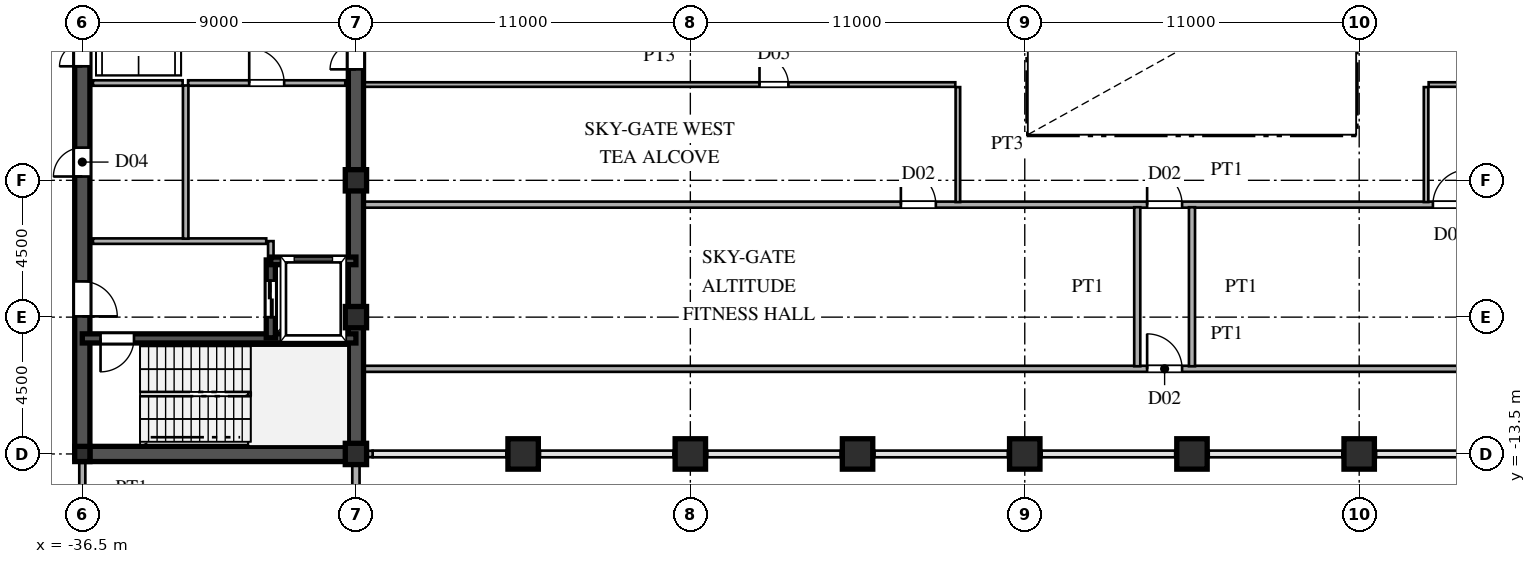
"""IFC4 building model, lengths in metres.
Left out: names, types, materials, properties, quantities, classifications, styles, units other than length and angle.
Written with IfcOpenShell. Run it as: python <this file> out.ifc"""

import sys

from ifc_helpers import new_model, si_unit, direction, frame, frame_2d, origin, origin_2d, place, context, subcontext, project, spatial, rectangle, hollow_rectangle, i_section, extrude, source, transform, mapped, element, fill, save


model = new_model("IFC4")
c1 = context("Model", 3, precision=1e-05, world=origin(), true_north=direction((0.0, 1.0)))
c2 = subcontext(c1, "Body", "Model", "MODEL_VIEW")
j1 = project(units=[si_unit("LENGTHUNIT", "METRE"), si_unit("PLANEANGLEUNIT", "RADIAN")], contexts=[c1])
p1 = place(None, origin())
s1 = spatial("IfcSite", under=j1, at=p1, CompositionType="ELEMENT")
p2 = place(p1, origin())
s2 = spatial("IfcBuilding", under=s1, at=p2, CompositionType="ELEMENT")
p3 = place(p2, frame((0.0, 0.0, 234.6)))
s3 = spatial("IfcBuildingStorey", under=s2, at=p3, CompositionType="ELEMENT", Elevation=234.6)
m1 = source(origin(), c2, "Body", "SweptSolid", [
    extrude(hollow_rectangle(XDim=0.7, YDim=0.7, WallThickness=0.03, at=origin_2d()), origin(), (0.0, 0.0, 1.0), 4.8),
])
for number, where, z_axis, x_axis in (
    (1, (-27.5, -13.5, 0.0), (0.0, 0.0, 1.0), (1.0, 0.0, 0.0)),
    (2, (-27.5, -9.0, 0.0), (0.0, 0.0, 1.0), (1.0, 0.0, 0.0)),
    (3, (-27.5, -4.5, 0.0), (0.0, 0.0, 1.0), (1.0, 0.0, 0.0)),
):
    element("IfcColumn", number, at=place(p3, frame(where, z_axis=z_axis, x_axis=x_axis)), inside=s3, PredefinedType="COLUMN", context=c2, shape_type="MappedRepresentation", body=[
        mapped(m1, transform((0.0, 0.0, 0.0), scale=1.0)),
    ])
m2 = source(origin(), c2, "Body", "SweptSolid", [
    extrude(i_section(OverallWidth=0.5, OverallDepth=0.5, WebThickness=0.02, FlangeThickness=0.032, at=origin_2d()), origin(), (0.0, 0.0, 1.0), 4.8),
])
p4 = place(p3, frame((-36.5, -13.5, 0.0), z_axis=(0.0, 0.0, 1.0), x_axis=(1.0, 0.0, 0.0)))
e4 = element("IfcColumn", 4, at=p4, inside=s3, PredefinedType="COLUMN", context=c2, shape_type="MappedRepresentation", body=[
    mapped(m2, transform((0.0, 0.0, 0.0), scale=1.0)),
])
m3 = source(origin(), c2, "Body", "SweptSolid", [
    extrude(hollow_rectangle(XDim=1.0, YDim=1.0, WallThickness=0.042, at=origin_2d()), origin(), (0.0, 0.0, 1.0), 4.8),
])
for number, where, z_axis, x_axis in (
    (5, (-22.0, -13.5, 0.0), (0.0, 0.0, 1.0), (1.0, 0.0, 0.0)),
    (6, (-16.5, -13.5, 0.0), (0.0, 0.0, 1.0), (1.0, 0.0, 0.0)),
    (7, (-11.0, -13.5, 0.0), (0.0, 0.0, 1.0), (1.0, 0.0, 0.0)),
    (8, (-5.5, -13.5, 0.0), (0.0, 0.0, 1.0), (1.0, 0.0, 0.0)),
    (9, (0.0, -13.5, 0.0), (0.0, 0.0, 1.0), (1.0, 0.0, 0.0)),
    (10, (5.5, -13.5, 0.0), (0.0, 0.0, 1.0), (1.0, 0.0, 0.0)),
):
    element("IfcColumn", number, at=place(p3, frame(where, z_axis=z_axis, x_axis=x_axis)), inside=s3, PredefinedType="COLUMN", context=c2, shape_type="MappedRepresentation", body=[
        mapped(m3, transform((0.0, 0.0, 0.0), scale=1.0)),
    ])
p5 = place(p3, frame((-27.5, -15.98, 0.0), z_axis=(0.0, 0.0, 1.0), x_axis=(0.0, 1.0, 0.0)))
e11 = element("IfcWall", 11, at=p5, inside=s3, PredefinedType="SOLIDWALL", context=c2, shape_type="SweptSolid", body=[
    extrude(rectangle(XDim=1.605, YDim=0.24, at=frame_2d((0.803, 0.0))), origin(), (0.0, 0.0, 1.0), 4.58),
])
p6 = place(p3, frame((-27.5, -14.375, 0.0), z_axis=(0.0, 0.0, 1.0), x_axis=(0.0, 1.0, 0.0)))
e12 = element("IfcWall", 12, at=p6, inside=s3, PredefinedType="SOLIDWALL", context=c2, shape_type="SweptSolid", body=[
    extrude(rectangle(XDim=0.62, YDim=0.24, at=frame_2d((0.31, 0.0))), origin(), (0.0, 0.0, 1.0), 4.08),
])
p7 = place(p3, frame((-27.49, -13.5, 0.0), z_axis=(0.0, 0.0, 1.0), x_axis=(1.0, 0.0, 0.0)))
e13 = element("IfcWall", 13, at=p7, inside=s3, PredefinedType="SOLIDWALL", context=c2, shape_type="SweptSolid", body=[
    extrude(rectangle(XDim=0.54, YDim=0.21, at=frame_2d((0.27, 0.0))), origin(), (0.0, 0.0, 1.0), 2.78),
])
for number, where, z_axis, x_axis in (
    (14, (-22.55, -13.5, 0.0), (0.0, 0.0, 1.0), (1.0, 0.0, 0.0)),
    (15, (-17.05, -13.5, 0.0), (0.0, 0.0, 1.0), (1.0, 0.0, 0.0)),
    (16, (-11.55, -13.5, 0.0), (0.0, 0.0, 1.0), (1.0, 0.0, 0.0)),
    (17, (-6.05, -13.5, 0.0), (0.0, 0.0, 1.0), (1.0, 0.0, 0.0)),
    (18, (-0.55, -13.5, 0.0), (0.0, 0.0, 1.0), (1.0, 0.0, 0.0)),
    (19, (4.95, -13.5, 0.0), (0.0, 0.0, 1.0), (1.0, 0.0, 0.0)),
):
    element("IfcWall", number, at=place(p3, frame(where, z_axis=z_axis, x_axis=x_axis)), inside=s3, PredefinedType="SOLIDWALL", context=c2, shape_type="SweptSolid", body=[
        extrude(rectangle(XDim=1.1, YDim=0.21, at=frame_2d((0.55, 0.0))), origin(), (0.0, 0.0, 1.0), 2.78),
    ])
p8 = place(p3, frame((-27.5, -13.5, 0.0), z_axis=(0.0, 0.0, 1.0), x_axis=(0.0, 1.0, 0.0)))
e20 = element("IfcWall", 20, at=p8, inside=s3, PredefinedType="SHEAR", context=c2, shape_type="SweptSolid", body=[
    extrude(rectangle(XDim=12.2, YDim=0.5, at=frame_2d((6.1, 0.0))), origin(), (0.0, 0.0, 1.0), 4.58),
])
p9 = place(p3, frame((-27.5, -1.3, 0.0), z_axis=(0.0, 0.0, 1.0), x_axis=(0.0, 1.0, 0.0)))
e21 = element("IfcWall", 21, at=p9, inside=s3, PredefinedType="SHEAR", context=c2, shape_type="SweptSolid", body=[
    extrude(rectangle(XDim=2.6, YDim=0.5, at=frame_2d((1.3, 0.0))), origin(), (0.0, 0.0, 1.0), 4.58),
])
p10 = place(p9, frame((0.45, 0.0, 0.0)))
e22 = element("IfcOpeningElement", 22, at=p10, cuts=e21, PredefinedType="OPENING", context=c2, shape_type="SweptSolid", body=[
    extrude(rectangle(XDim=1.7, YDim=2.35, at=frame_2d((0.85, 1.175))), frame((0.0, 0.26, 0.0), z_axis=(0.0, -1.0, 0.0), x_axis=(1.0, 0.0, 0.0)), (0.0, 0.0, 1.0), 0.52),
])
p11 = place(p3, frame((-36.5, -13.5, 0.0), z_axis=(0.0, 0.0, 1.0), x_axis=(1.0, 0.0, 0.0)))
e23 = element("IfcWall", 23, at=p11, inside=s3, PredefinedType="SHEAR", context=c2, shape_type="SweptSolid", body=[
    extrude(rectangle(XDim=9.0, YDim=0.5, at=frame_2d((4.5, 0.0))), origin(), (0.0, 0.0, 1.0), 4.58),
])
p12 = place(p3, frame((-36.5, -13.65, 0.0), z_axis=(0.0, 0.0, 1.0), x_axis=(0.0, 1.0, 0.0)))
e24 = element("IfcWall", 24, at=p12, inside=s3, PredefinedType="SHEAR", context=c2, shape_type="SweptSolid", body=[
    extrude(rectangle(XDim=7.15, YDim=0.5, at=frame_2d((3.575, 0.0))), origin(), (0.0, 0.0, 1.0), 4.58),
])
p13 = place(p12, frame((4.675, 0.0, 0.0)))
e25 = element("IfcOpeningElement", 25, at=p13, cuts=e24, PredefinedType="OPENING", context=c2, shape_type="SweptSolid", body=[
    extrude(rectangle(XDim=1.15, YDim=2.2, at=frame_2d((0.575, 1.1))), frame((0.0, 0.26, 0.0), z_axis=(0.0, -1.0, 0.0), x_axis=(1.0, 0.0, 0.0)), (0.0, 0.0, 1.0), 0.52),
])
p14 = place(p3, frame((-36.5, -1.3, 0.0), z_axis=(0.0, 0.0, 1.0), x_axis=(0.0, 1.0, 0.0)))
e26 = element("IfcWall", 26, at=p14, inside=s3, PredefinedType="SHEAR", context=c2, shape_type="SweptSolid", body=[
    extrude(rectangle(XDim=2.6, YDim=0.5, at=frame_2d((1.3, 0.0))), origin(), (0.0, 0.0, 1.0), 4.58),
])
p15 = place(p14, frame((0.55, 0.0, 0.0)))
e27 = element("IfcOpeningElement", 27, at=p15, cuts=e26, PredefinedType="OPENING", context=c2, shape_type="SweptSolid", body=[
    extrude(rectangle(XDim=1.5, YDim=2.3, at=frame_2d((0.75, 1.15))), frame((0.0, 0.26, 0.0), z_axis=(0.0, -1.0, 0.0), x_axis=(1.0, 0.0, 0.0)), (0.0, 0.0, 1.0), 0.52),
])
p16 = place(p3, frame((-36.5, -6.5, 0.0), z_axis=(0.0, 0.0, 1.0), x_axis=(0.0, 1.0, 0.0)))
e28 = element("IfcWall", 28, at=p16, inside=s3, PredefinedType="SHEAR", context=c2, shape_type="SweptSolid", body=[
    extrude(rectangle(XDim=5.2, YDim=0.5, at=frame_2d((2.6, 0.0))), origin(), (0.0, 0.0, 1.0), 4.58),
])
p17 = place(p16, frame((2.125, 0.0, 0.0)))
e29 = element("IfcOpeningElement", 29, at=p17, cuts=e28, PredefinedType="OPENING", context=c2, shape_type="SweptSolid", body=[
    extrude(rectangle(XDim=0.95, YDim=2.15, at=frame_2d((0.475, 1.075))), frame((0.0, 0.26, 0.0), z_axis=(0.0, -1.0, 0.0), x_axis=(1.0, 0.0, 0.0)), (0.0, 0.0, 1.0), 0.52),
])
p18 = place(p3, frame((-36.5, -9.7, 0.0), z_axis=(0.0, 0.0, 1.0), x_axis=(1.0, 0.0, 0.0)))
e30 = element("IfcWall", 30, at=p18, inside=s3, PredefinedType="SHEAR", context=c2, shape_type="SweptSolid", body=[
    extrude(rectangle(XDim=9.0, YDim=0.3, at=frame_2d((4.5, 0.0))), origin(), (0.0, 0.0, 1.0), 4.58),
])
p19 = place(p18, frame((0.6, 0.0, 0.0)))
e31 = element("IfcOpeningElement", 31, at=p19, cuts=e30, PredefinedType="OPENING", context=c2, shape_type="SweptSolid", body=[
    extrude(rectangle(XDim=1.1, YDim=2.2, at=frame_2d((0.55, 1.1))), frame((0.0, 0.16, 0.0), z_axis=(0.0, -1.0, 0.0), x_axis=(1.0, 0.0, 0.0)), (0.0, 0.0, 1.0), 0.32),
])
p20 = place(p3, frame((-30.3, -7.15, 0.0), z_axis=(0.0, 0.0, 1.0), x_axis=(1.0, 0.0, 0.0)))
e32 = element("IfcWall", 32, at=p20, inside=s3, PredefinedType="SHEAR", context=c2, shape_type="SweptSolid", body=[
    extrude(rectangle(XDim=2.8, YDim=0.25, at=frame_2d((1.4, 0.0))), origin(), (0.0, 0.0, 1.0), 4.58),
])
p21 = place(p3, frame((-30.3, -9.68, 0.0), z_axis=(0.0, 0.0, 1.0), x_axis=(0.0, 1.0, 0.0)))
e33 = element("IfcWall", 33, at=p21, inside=s3, PredefinedType="SHEAR", context=c2, shape_type="SweptSolid", body=[
    extrude(rectangle(XDim=2.56, YDim=0.3, at=frame_2d((1.28, 0.0))), origin(), (0.0, 0.0, 1.0), 4.58),
])
p22 = place(p21, frame((0.68, 0.0, 0.0)))
e34 = element("IfcOpeningElement", 34, at=p22, cuts=e33, PredefinedType="OPENING", context=c2, shape_type="SweptSolid", body=[
    extrude(rectangle(XDim=1.2, YDim=2.25, at=frame_2d((0.6, 1.125))), frame((0.0, 0.16, 0.0), z_axis=(0.0, -1.0, 0.0), x_axis=(1.0, 0.0, 0.0)), (0.0, 0.0, 1.0), 0.32),
])
p23 = place(p3, frame((-36.15, -6.5, 0.0), z_axis=(0.0, 0.0, 1.0), x_axis=(1.0, 0.0, 0.0)))
e35 = element("IfcWall", 35, at=p23, inside=s3, PredefinedType="PARTITIONING", context=c2, shape_type="SweptSolid", body=[
    extrude(rectangle(XDim=5.7, YDim=0.18, at=frame_2d((2.85, 0.0))), origin(), (0.0, 0.0, 1.0), 4.58),
])
p24 = place(p3, frame((-30.3, -7.12, 0.0), z_axis=(0.0, 0.0, 1.0), x_axis=(0.0, 1.0, 0.0)))
e36 = element("IfcWall", 36, at=p24, inside=s3, PredefinedType="PARTITIONING", context=c2, shape_type="SweptSolid", body=[
    extrude(rectangle(XDim=0.62, YDim=0.18, at=frame_2d((0.31, 0.0))), origin(), (0.0, 0.0, 1.0), 4.58),
])
p25 = place(p3, frame((-33.1, -6.42, 0.0), z_axis=(0.0, 0.0, 1.0), x_axis=(0.0, 1.0, 0.0)))
e37 = element("IfcWall", 37, at=p25, inside=s3, PredefinedType="PARTITIONING", context=c2, shape_type="SweptSolid", body=[
    extrude(rectangle(XDim=5.04, YDim=0.18, at=frame_2d((2.52, 0.0))), origin(), (0.0, 0.0, 1.0), 4.58),
])
p26 = place(p3, frame((-33.02, -1.3, 0.0), z_axis=(0.0, 0.0, 1.0), x_axis=(1.0, 0.0, 0.0)))
e38 = element("IfcWall", 38, at=p26, inside=s3, PredefinedType="PARTITIONING", context=c2, shape_type="SweptSolid", body=[
    extrude(rectangle(XDim=5.17, YDim=0.18, at=frame_2d((2.585, 0.0))), origin(), (0.0, 0.0, 1.0), 4.58),
])
p27 = place(p26, frame((2.01, 0.0, 0.0)))
e39 = element("IfcOpeningElement", 39, at=p27, cuts=e38, PredefinedType="OPENING", context=c2, shape_type="SweptSolid", body=[
    extrude(rectangle(XDim=1.15, YDim=2.2, at=frame_2d((0.575, 1.1))), frame((0.0, 0.1, 0.0), z_axis=(0.0, -1.0, 0.0), x_axis=(1.0, 0.0, 0.0)), (0.0, 0.0, 1.0), 0.2),
])
p28 = place(p3, frame((-36.15, -1.3, 0.0), z_axis=(0.0, 0.0, 1.0), x_axis=(1.0, 0.0, 0.0)))
e40 = element("IfcWall", 40, at=p28, inside=s3, PredefinedType="PARTITIONING", context=c2, shape_type="SweptSolid", body=[
    extrude(rectangle(XDim=2.95, YDim=0.18, at=frame_2d((1.475, 0.0))), origin(), (0.0, 0.0, 1.0), 4.58),
])
p29 = place(p3, frame((-27.245, -10.7, 0.0), z_axis=(0.0, 0.0, 1.0), x_axis=(1.0, 0.0, 0.0)))
e41 = element("IfcWall", 41, at=p29, inside=s3, PredefinedType="PARTITIONING", context=c2, shape_type="SweptSolid", body=[
    extrude(rectangle(XDim=54.49, YDim=0.2, at=frame_2d((27.245, 0.0))), origin(), (0.0, 0.0, 1.0), 4.58),
])
p30 = place(p29, frame((25.77, 0.0, 0.0)))
e42 = element("IfcOpeningElement", 42, at=p30, cuts=e41, PredefinedType="OPENING", context=c2, shape_type="SweptSolid", body=[
    extrude(rectangle(XDim=1.15, YDim=2.2, at=frame_2d((0.575, 1.1))), frame((0.0, 0.11, 0.0), z_axis=(0.0, -1.0, 0.0), x_axis=(1.0, 0.0, 0.0)), (0.0, 0.0, 1.0), 0.22),
])
p31 = place(p3, frame((-27.245, -5.3, 0.0), z_axis=(0.0, 0.0, 1.0), x_axis=(1.0, 0.0, 0.0)))
e43 = element("IfcWall", 43, at=p31, inside=s3, PredefinedType="PARTITIONING", context=c2, shape_type="SweptSolid", body=[
    extrude(rectangle(XDim=54.49, YDim=0.2, at=frame_2d((27.245, 0.0))), origin(), (0.0, 0.0, 1.0), 4.58),
])
p32 = place(p31, frame((25.77, 0.0, 0.0)))
e44 = element("IfcOpeningElement", 44, at=p32, cuts=e43, PredefinedType="OPENING", context=c2, shape_type="SweptSolid", body=[
    extrude(rectangle(XDim=1.15, YDim=2.2, at=frame_2d((0.575, 1.1))), frame((0.0, 0.11, 0.0), z_axis=(0.0, -1.0, 0.0), x_axis=(1.0, 0.0, 0.0)), (0.0, 0.0, 1.0), 0.22),
])
p33 = place(p31, frame((17.67, 0.0, 0.0)))
e45 = element("IfcOpeningElement", 45, at=p33, cuts=e43, PredefinedType="OPENING", context=c2, shape_type="SweptSolid", body=[
    extrude(rectangle(XDim=1.15, YDim=2.2, at=frame_2d((0.575, 1.1))), frame((0.0, 0.11, 0.0), z_axis=(0.0, -1.0, 0.0), x_axis=(1.0, 0.0, 0.0)), (0.0, 0.0, 1.0), 0.22),
])
p34 = place(p31, frame((35.17, 0.0, 0.0)))
e46 = element("IfcOpeningElement", 46, at=p34, cuts=e43, PredefinedType="OPENING", context=c2, shape_type="SweptSolid", body=[
    extrude(rectangle(XDim=1.15, YDim=2.2, at=frame_2d((0.575, 1.1))), frame((0.0, 0.11, 0.0), z_axis=(0.0, -1.0, 0.0), x_axis=(1.0, 0.0, 0.0)), (0.0, 0.0, 1.0), 0.22),
])
p35 = place(p3, frame((-27.245, -1.35, 0.0), z_axis=(0.0, 0.0, 1.0), x_axis=(1.0, 0.0, 0.0)))
e47 = element("IfcWall", 47, at=p35, inside=s3, PredefinedType="PARTITIONING", context=c2, shape_type="SweptSolid", body=[
    extrude(rectangle(XDim=19.46, YDim=0.15, at=frame_2d((9.73, 0.0))), origin(), (0.0, 0.0, 1.0), 4.58),
])
p36 = place(p35, frame((13.02, 0.0, 0.0)))
e48 = element("IfcOpeningElement", 48, at=p36, cuts=e47, PredefinedType="OPENING", context=c2, shape_type="SweptSolid", body=[
    extrude(rectangle(XDim=0.95, YDim=2.15, at=frame_2d((0.475, 1.075))), frame((0.0, 0.085, 0.0), z_axis=(0.0, -1.0, 0.0), x_axis=(1.0, 0.0, 0.0)), (0.0, 0.0, 1.0), 0.17),
])
p37 = place(p3, frame((7.785, -1.35, 0.0), z_axis=(0.0, 0.0, 1.0), x_axis=(1.0, 0.0, 0.0)))
e49 = element("IfcWall", 49, at=p37, inside=s3, PredefinedType="PARTITIONING", context=c2, shape_type="SweptSolid", body=[
    extrude(rectangle(XDim=19.46, YDim=0.15, at=frame_2d((9.73, 0.0))), origin(), (0.0, 0.0, 1.0), 4.58),
])
p38 = place(p37, frame((5.49, 0.0, 0.0)))
e50 = element("IfcOpeningElement", 50, at=p38, cuts=e49, PredefinedType="OPENING", context=c2, shape_type="SweptSolid", body=[
    extrude(rectangle(XDim=0.95, YDim=2.15, at=frame_2d((0.475, 1.075))), frame((0.0, 0.085, 0.0), z_axis=(0.0, -1.0, 0.0), x_axis=(1.0, 0.0, 0.0)), (0.0, 0.0, 1.0), 0.17),
])
p39 = place(p3, frame((-36.5, -15.515, 0.0), z_axis=(0.0, 0.0, 1.0), x_axis=(0.0, 1.0, 0.0)))
e51 = element("IfcWall", 51, at=p39, inside=s3, PredefinedType="PARTITIONING", context=c2, shape_type="SweptSolid", body=[
    extrude(rectangle(XDim=1.76, YDim=0.2, at=frame_2d((0.88, 0.0))), origin(), (0.0, 0.0, 1.0), 3.98),
])
p40 = place(p3, frame((-7.7, -5.215, 0.0), z_axis=(0.0, 0.0, 1.0), x_axis=(0.0, 1.0, 0.0)))
e52 = element("IfcWall", 52, at=p40, inside=s3, PredefinedType="PARTITIONING", context=c2, shape_type="SweptSolid", body=[
    extrude(rectangle(XDim=3.78, YDim=0.15, at=frame_2d((1.89, 0.0))), origin(), (0.0, 0.0, 1.0), 4.58),
])
p41 = place(p3, frame((-1.8, -10.615, 0.0), z_axis=(0.0, 0.0, 1.0), x_axis=(0.0, 1.0, 0.0)))
e53 = element("IfcWall", 53, at=p41, inside=s3, PredefinedType="PARTITIONING", context=c2, shape_type="SweptSolid", body=[
    extrude(rectangle(XDim=5.23, YDim=0.2, at=frame_2d((2.615, 0.0))), origin(), (0.0, 0.0, 1.0), 4.58),
])
p42 = place(p3, frame((0.0, -10.615, 0.0), z_axis=(0.0, 0.0, 1.0), x_axis=(0.0, 1.0, 0.0)))
e54 = element("IfcWall", 54, at=p42, inside=s3, PredefinedType="PARTITIONING", context=c2, shape_type="SweptSolid", body=[
    extrude(rectangle(XDim=5.23, YDim=0.2, at=frame_2d((2.615, 0.0))), origin(), (0.0, 0.0, 1.0), 3.48),
])
p43 = place(p3, frame((7.7, -5.215, 0.0), z_axis=(0.0, 0.0, 1.0), x_axis=(0.0, 1.0, 0.0)))
e55 = element("IfcWall", 55, at=p43, inside=s3, PredefinedType="PARTITIONING", context=c2, shape_type="SweptSolid", body=[
    extrude(rectangle(XDim=3.78, YDim=0.15, at=frame_2d((1.89, 0.0))), origin(), (0.0, 0.0, 1.0), 4.58),
])
m4 = source(origin(), c2, "Body", "SweptSolid", [
    extrude(rectangle(XDim=1.7, YDim=2.35, at=frame_2d((0.85, 1.175))), frame((0.0, 0.025, 0.0), z_axis=(0.0, -1.0, 0.0), x_axis=(1.0, 0.0, 0.0)), (0.0, 0.0, 1.0), 0.05),
])
p44 = place(p10, origin())
e56 = element("IfcDoor", 56, at=p44, inside=s3, OperationType="DOUBLE_SWING_LEFT", PredefinedType="DOOR", context=c2, shape_type="MappedRepresentation", body=[
    mapped(m4, transform((0.0, 0.0, 0.0), scale=1.0)),
])
fill(e22, e56)
m5 = source(origin(), c2, "Body", "SweptSolid", [
    extrude(rectangle(XDim=1.15, YDim=2.2, at=frame_2d((0.575, 1.1))), frame((0.0, 0.025, 0.0), z_axis=(0.0, -1.0, 0.0), x_axis=(1.0, 0.0, 0.0)), (0.0, 0.0, 1.0), 0.05),
])
p45 = place(p13, frame((1.15, 0.0, 0.0), z_axis=(0.0, 0.0, 1.0), x_axis=(-1.0, 0.0, 0.0)))
e57 = element("IfcDoor", 57, at=p45, inside=s3, OperationType="SINGLE_SWING_LEFT", PredefinedType="DOOR", context=c2, shape_type="MappedRepresentation", body=[
    mapped(m5, transform((0.0, 0.0, 0.0), scale=1.0)),
])
fill(e25, e57)
m6 = source(origin(), c2, "Body", "SweptSolid", [
    extrude(rectangle(XDim=1.5, YDim=2.3, at=frame_2d((0.75, 1.15))), frame((0.0, 0.025, 0.0), z_axis=(0.0, -1.0, 0.0), x_axis=(1.0, 0.0, 0.0)), (0.0, 0.0, 1.0), 0.05),
])
p46 = place(p15, origin())
e58 = element("IfcDoor", 58, at=p46, inside=s3, OperationType="DOUBLE_SWING_LEFT", PredefinedType="DOOR", context=c2, shape_type="MappedRepresentation", body=[
    mapped(m6, transform((0.0, 0.0, 0.0), scale=1.0)),
])
fill(e27, e58)
m7 = source(origin(), c2, "Body", "SweptSolid", [
    extrude(rectangle(XDim=0.95, YDim=2.15, at=frame_2d((0.475, 1.075))), frame((0.0, 0.025, 0.0), z_axis=(0.0, -1.0, 0.0), x_axis=(1.0, 0.0, 0.0)), (0.0, 0.0, 1.0), 0.05),
])
p47 = place(p17, origin())
e59 = element("IfcDoor", 59, at=p47, inside=s3, OperationType="SINGLE_SWING_LEFT", PredefinedType="DOOR", context=c2, shape_type="MappedRepresentation", body=[
    mapped(m7, transform((0.0, 0.0, 0.0), scale=1.0)),
])
fill(e29, e59)
m8 = source(origin(), c2, "Body", "SweptSolid", [
    extrude(rectangle(XDim=1.1, YDim=2.2, at=frame_2d((0.55, 1.1))), frame((0.0, 0.025, 0.0), z_axis=(0.0, -1.0, 0.0), x_axis=(1.0, 0.0, 0.0)), (0.0, 0.0, 1.0), 0.05),
])
p48 = place(p19, frame((1.1, 0.0, 0.0), z_axis=(0.0, 0.0, 1.0), x_axis=(-1.0, 0.0, 0.0)))
e60 = element("IfcDoor", 60, at=p48, inside=s3, OperationType="SINGLE_SWING_LEFT", PredefinedType="DOOR", context=c2, shape_type="MappedRepresentation", body=[
    mapped(m8, transform((0.0, 0.0, 0.0), scale=1.0)),
])
fill(e31, e60)
m9 = source(origin(), c2, "Body", "SweptSolid", [
    extrude(rectangle(XDim=1.2, YDim=2.25, at=frame_2d((0.6, 1.125))), frame((0.0, 0.025, 0.0), z_axis=(0.0, -1.0, 0.0), x_axis=(1.0, 0.0, 0.0)), (0.0, 0.0, 1.0), 0.05),
])
p49 = place(p22, origin())
e61 = element("IfcDoor", 61, at=p49, inside=s3, OperationType="DOUBLE_DOOR_SLIDING", PredefinedType="DOOR", context=c2, shape_type="MappedRepresentation", body=[
    mapped(m9, transform((0.0, 0.0, 0.0), scale=1.0)),
])
fill(e34, e61)
p50 = place(p27, origin())
e62 = element("IfcDoor", 62, at=p50, inside=s3, OperationType="SINGLE_SWING_LEFT", PredefinedType="DOOR", context=c2, shape_type="MappedRepresentation", body=[
    mapped(m5, transform((0.0, 0.0, 0.0), scale=1.0)),
])
fill(e39, e62)
p51 = place(p30, origin())
e63 = element("IfcDoor", 63, at=p51, inside=s3, OperationType="SINGLE_SWING_LEFT", PredefinedType="DOOR", context=c2, shape_type="MappedRepresentation", body=[
    mapped(m5, transform((0.0, 0.0, 0.0), scale=1.0)),
])
fill(e42, e63)
p52 = place(p32, origin())
e64 = element("IfcDoor", 64, at=p52, inside=s3, OperationType="SINGLE_SWING_LEFT", PredefinedType="DOOR", context=c2, shape_type="MappedRepresentation", body=[
    mapped(m5, transform((0.0, 0.0, 0.0), scale=1.0)),
])
fill(e44, e64)
p53 = place(p33, origin())
e65 = element("IfcDoor", 65, at=p53, inside=s3, OperationType="SINGLE_SWING_LEFT", PredefinedType="DOOR", context=c2, shape_type="MappedRepresentation", body=[
    mapped(m5, transform((0.0, 0.0, 0.0), scale=1.0)),
])
fill(e45, e65)
p54 = place(p34, origin())
e66 = element("IfcDoor", 66, at=p54, inside=s3, OperationType="SINGLE_SWING_RIGHT", PredefinedType="DOOR", context=c2, shape_type="MappedRepresentation", body=[
    mapped(m5, transform((0.0, 0.0, 0.0), scale=1.0)),
])
fill(e46, e66)
m10 = source(origin(), c2, "Body", "SweptSolid", [
    extrude(rectangle(XDim=0.95, YDim=2.15, at=frame_2d((0.475, 1.075))), frame((0.0, 0.025, 0.0), z_axis=(0.0, -1.0, 0.0), x_axis=(1.0, 0.0, 0.0)), (0.0, 0.0, 1.0), 0.05),
])
p55 = place(p36, origin())
e67 = element("IfcDoor", 67, at=p55, inside=s3, OperationType="SINGLE_SWING_LEFT", PredefinedType="DOOR", context=c2, shape_type="MappedRepresentation", body=[
    mapped(m10, transform((0.0, 0.0, 0.0), scale=1.0)),
])
fill(e48, e67)
save(model, sys.argv[1])
